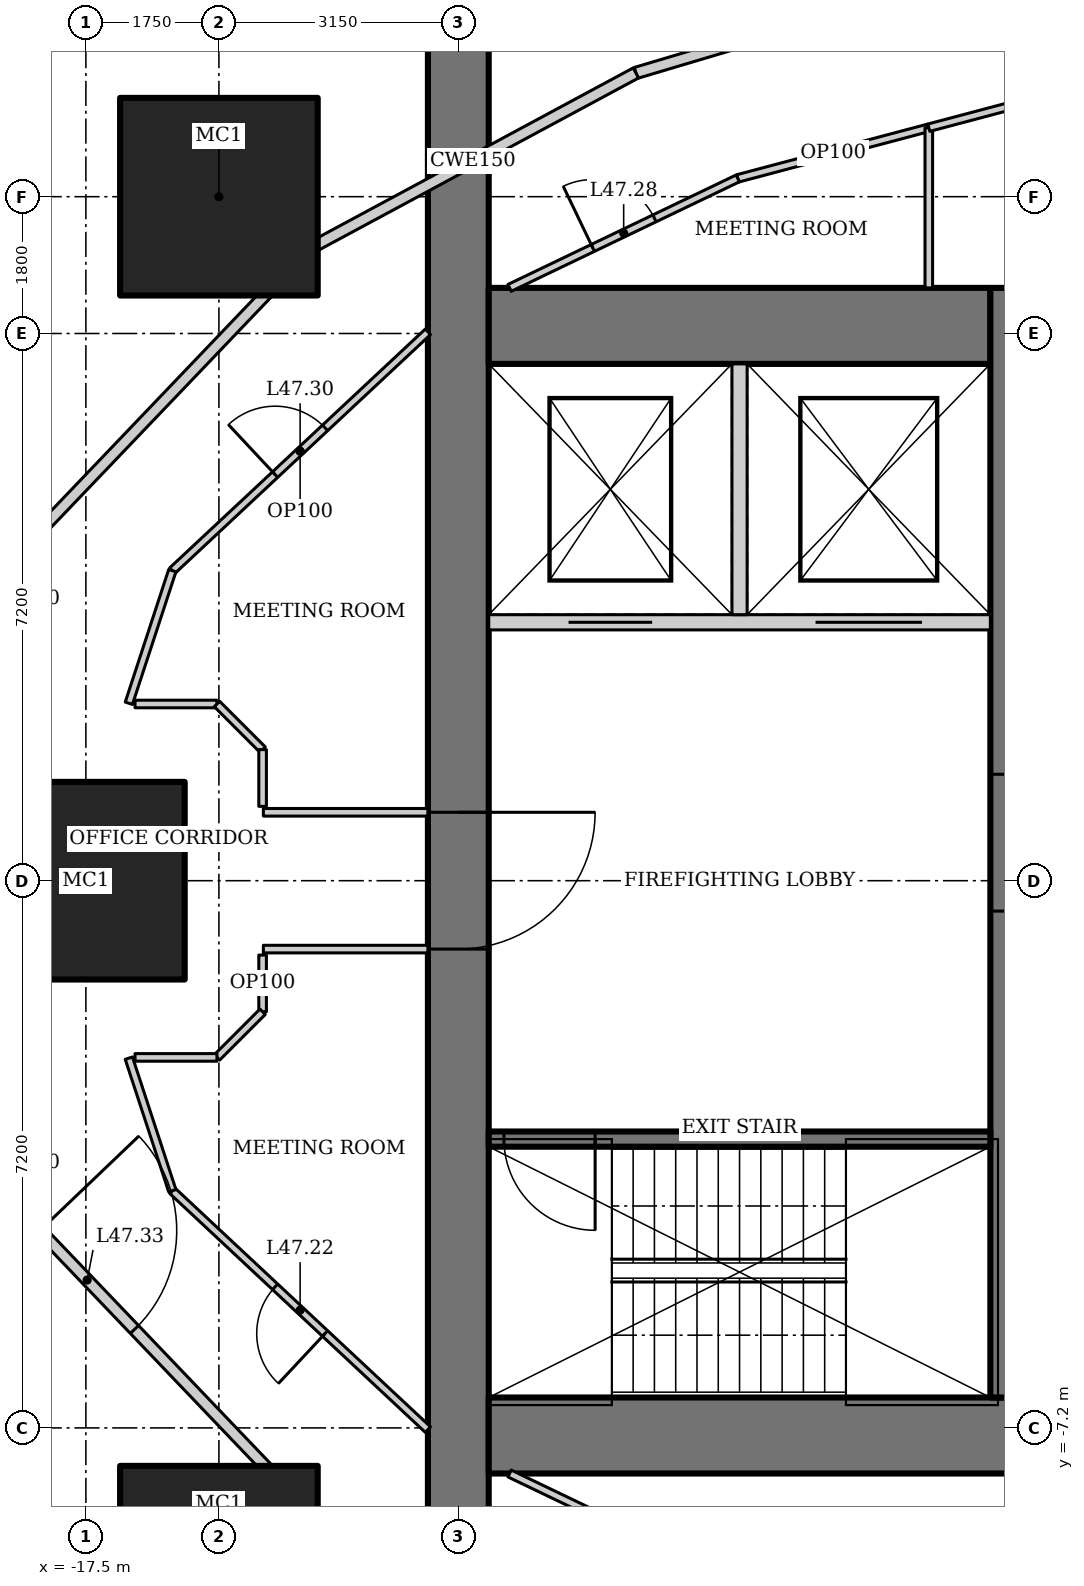
"""IFC4 building model, lengths in metres.
Left out: names, types, materials, properties, quantities, classifications, styles, units other than length and angle.
Written with IfcOpenShell. Run it as: python <this file> out.ifc"""

import sys

from ifc_helpers import new_model, si_unit, direction, frame, frame_2d, origin, origin_2d, place, context, subcontext, project, spatial, rectangle, hollow_rectangle, extrude, element, fill, save


model = new_model("IFC4")
c1 = context("Model", 3, precision=1e-05, world=origin(), true_north=direction((0.0, 1.0)))
c2 = subcontext(c1, "Body", "Model", "MODEL_VIEW")
j1 = project(units=[si_unit("LENGTHUNIT", "METRE"), si_unit("PLANEANGLEUNIT", "RADIAN")], contexts=[c1])
p1 = place(None, origin())
s1 = spatial("IfcSite", under=j1, at=p1, CompositionType="ELEMENT")
p2 = place(p1, origin())
s2 = spatial("IfcBuilding", under=s1, at=p2, CompositionType="ELEMENT")
p3 = place(p2, frame((0.0, 0.0, 203.2)))
s3 = spatial("IfcBuildingStorey", under=s2, at=p3, CompositionType="ELEMENT", Elevation=203.2)
for number, where, z_axis, x_axis in (
    (1, (-15.75, 9.0, 0.0), (0.0, 0.0, 1.0), (1.0, 0.0, 0.0)),
    (2, (-17.5, 0.0, 0.0), (0.0, 0.0, 1.0), (1.0, 0.0, 0.0)),
    (3, (-15.75, -9.0, 0.0), (0.0, 0.0, 1.0), (1.0, 0.0, 0.0)),
):
    element("IfcColumn", number, at=place(p3, frame(where, z_axis=z_axis, x_axis=x_axis)), inside=s3, PredefinedType="COLUMN", context=c2, shape_type="SweptSolid", body=[
        extrude(hollow_rectangle(XDim=2.6, YDim=2.6, WallThickness=0.13, at=origin_2d()), origin(), (0.0, 0.0, 1.0), 4.2),
    ])
p4 = place(p3, frame((-12.6, 13.0, 0.0), z_axis=(0.0, 0.0, 1.0), x_axis=(0.0, -1.0, 0.0)))
e4 = element("IfcWall", 4, at=p4, inside=s3, PredefinedType="SHEAR", context=c2, shape_type="SweptSolid", body=[
    extrude(rectangle(XDim=26.0, YDim=0.8, at=frame_2d((13.0, 0.0))), origin(), (0.0, 0.0, 1.0), 4.2),
])
p5 = place(p4, frame((12.1, 0.0, 0.0)))
e5 = element("IfcOpeningElement", 5, at=p5, cuts=e4, PredefinedType="OPENING", context=c2, shape_type="SweptSolid", body=[
    extrude(rectangle(XDim=1.8, YDim=2.1, at=frame_2d((0.9, 1.05))), frame((0.0, 0.41, 0.0), z_axis=(0.0, -1.0, 0.0), x_axis=(1.0, 0.0, 0.0)), (0.0, 0.0, 1.0), 0.82),
])
p6 = place(p3, frame((-12.2, -7.3, 0.0), z_axis=(0.0, 0.0, 1.0), x_axis=(1.0, 0.0, 0.0)))
e6 = element("IfcWall", 6, at=p6, inside=s3, PredefinedType="SHEAR", context=c2, shape_type="SweptSolid", body=[
    extrude(rectangle(XDim=24.4, YDim=1.0, at=frame_2d((12.2, 0.0))), origin(), (0.0, 0.0, 1.0), 4.2),
])
p7 = place(p3, frame((-5.6, 7.3, 0.0), z_axis=(0.0, 0.0, 1.0), x_axis=(-1.0, 0.0, 0.0)))
e7 = element("IfcWall", 7, at=p7, inside=s3, PredefinedType="SHEAR", context=c2, shape_type="SweptSolid", body=[
    extrude(rectangle(XDim=6.6, YDim=1.0, at=frame_2d((3.3, 0.0))), origin(), (0.0, 0.0, 1.0), 4.2),
])
p8 = place(p3, frame((-5.4, 7.8, 0.0), z_axis=(0.0, 0.0, 1.0), x_axis=(0.0, -1.0, 0.0)))
e8 = element("IfcWall", 8, at=p8, inside=s3, PredefinedType="SHEAR", context=c2, shape_type="SweptSolid", body=[
    extrude(rectangle(XDim=14.6, YDim=0.4, at=frame_2d((7.3, 0.0))), origin(), (0.0, 0.0, 1.0), 4.2),
])
p9 = place(p8, frame((6.4, 0.0, 0.0)))
e9 = element("IfcOpeningElement", 9, at=p9, cuts=e8, PredefinedType="OPENING", context=c2, shape_type="SweptSolid", body=[
    extrude(rectangle(XDim=1.8, YDim=2.1, at=frame_2d((0.9, 1.05))), frame((0.0, 0.21, 0.0), z_axis=(0.0, -1.0, 0.0), x_axis=(1.0, 0.0, 0.0)), (0.0, 0.0, 1.0), 0.42),
])
p10 = place(p3, frame((-5.6, -3.4, 0.0), z_axis=(0.0, 0.0, 1.0), x_axis=(-1.0, 0.0, 0.0)))
e10 = element("IfcWall", 10, at=p10, inside=s3, PredefinedType="SHEAR", context=c2, shape_type="SweptSolid", body=[
    extrude(rectangle(XDim=6.6, YDim=0.2, at=frame_2d((3.3, 0.0))), origin(), (0.0, 0.0, 1.0), 4.2),
])
p11 = place(p10, frame((5.2, 0.0, 0.0)))
e11 = element("IfcOpeningElement", 11, at=p11, cuts=e10, PredefinedType="OPENING", context=c2, shape_type="SweptSolid", body=[
    extrude(rectangle(XDim=1.2, YDim=2.1, at=frame_2d((0.6, 1.05))), frame((0.0, 0.11, 0.0), z_axis=(0.0, -1.0, 0.0), x_axis=(1.0, 0.0, 0.0)), (0.0, 0.0, 1.0), 0.22),
])
p12 = place(p3, frame((-12.2, 3.4, 0.0), z_axis=(0.0, 0.0, 1.0), x_axis=(1.0, 0.0, 0.0)))
e12 = element("IfcWall", 12, at=p12, inside=s3, PredefinedType="SOLIDWALL", context=c2, shape_type="SweptSolid", body=[
    extrude(rectangle(XDim=6.6, YDim=0.2, at=frame_2d((3.3, 0.0))), origin(), (0.0, 0.0, 1.0), 4.2),
])
p13 = place(p12, frame((1.05, 0.0, 0.0)))
e13 = element("IfcOpeningElement", 13, at=p13, cuts=e12, PredefinedType="OPENING", context=c2, shape_type="SweptSolid", body=[
    extrude(rectangle(XDim=1.1, YDim=2.2, at=frame_2d((0.55, 1.1))), frame((0.0, 0.11, 0.0), z_axis=(0.0, -1.0, 0.0), x_axis=(1.0, 0.0, 0.0)), (0.0, 0.0, 1.0), 0.22),
])
p14 = place(p12, frame((4.3, 0.0, 0.0)))
e14 = element("IfcOpeningElement", 14, at=p14, cuts=e12, PredefinedType="OPENING", context=c2, shape_type="SweptSolid", body=[
    extrude(rectangle(XDim=1.4, YDim=2.2, at=frame_2d((0.7, 1.1))), frame((0.0, 0.11, 0.0), z_axis=(0.0, -1.0, 0.0), x_axis=(1.0, 0.0, 0.0)), (0.0, 0.0, 1.0), 0.22),
])
p15 = place(p3, frame((-8.9, 3.5, 0.0), z_axis=(0.0, 0.0, 1.0), x_axis=(0.0, 1.0, 0.0)))
e15 = element("IfcWall", 15, at=p15, inside=s3, PredefinedType="SOLIDWALL", context=c2, shape_type="SweptSolid", body=[
    extrude(rectangle(XDim=3.3, YDim=0.2, at=frame_2d((1.65, 0.0))), origin(), (0.0, 0.0, 1.0), 4.2),
])
p16 = place(p3, frame((-6.054, 11.882, 0.0), z_axis=(0.0, 0.0, 1.0), x_axis=(-0.958384389306, -0.285480931648, 0.0)))
e16 = element("IfcWall", 16, at=p16, inside=s3, PredefinedType="PARTITIONING", context=c2, shape_type="SweptSolid", body=[
    extrude(rectangle(XDim=4.392, YDim=0.15, at=frame_2d((2.196, 0.0))), origin(), (0.0, 0.0, 1.0), 4.05),
])
p17 = place(p3, frame((-10.264, 10.628, 0.0), z_axis=(0.0, 0.0, 1.0), x_axis=(-0.88053863253, -0.47397438393, 0.0)))
e17 = element("IfcWall", 17, at=p17, inside=s3, PredefinedType="PARTITIONING", context=c2, shape_type="SweptSolid", body=[
    extrude(rectangle(XDim=4.875, YDim=0.15, at=frame_2d((2.438, 0.0))), origin(), (0.0, 0.0, 1.0), 4.05),
])
p18 = place(p3, frame((-14.556, 8.318, 0.0), z_axis=(0.0, 0.0, 1.0), x_axis=(-0.690768413292, -0.723076067366, 0.0)))
e18 = element("IfcWall", 18, at=p18, inside=s3, PredefinedType="PARTITIONING", context=c2, shape_type="SweptSolid", body=[
    extrude(rectangle(XDim=5.237, YDim=0.15, at=frame_2d((2.618, 0.0))), origin(), (0.0, 0.0, 1.0), 4.05),
])
p19 = place(p3, frame((-18.174, -4.531, 0.0), z_axis=(0.0, 0.0, 1.0), x_axis=(0.690768413292, -0.723076067366, 0.0)))
e19 = element("IfcWall", 19, at=p19, inside=s3, PredefinedType="PARTITIONING", context=c2, shape_type="SweptSolid", body=[
    extrude(rectangle(XDim=5.237, YDim=0.15, at=frame_2d((2.618, 0.0))), origin(), (0.0, 0.0, 1.0), 4.05),
])
p20 = place(p19, frame((0.1, 0.0, 0.0)))
e20 = element("IfcOpeningElement", 20, at=p20, cuts=e19, PredefinedType="OPENING", context=c2, shape_type="SweptSolid", body=[
    extrude(rectangle(XDim=1.8, YDim=2.1, at=frame_2d((0.9, 1.05))), frame((0.0, 0.085, 0.0), z_axis=(0.0, -1.0, 0.0), x_axis=(1.0, 0.0, 0.0)), (0.0, 0.0, 1.0), 0.17),
])
p21 = place(p3, frame((-13.0, -7.222, 0.0), z_axis=(0.0, 0.0, 1.0), x_axis=(-0.730651186567, 0.682750938167, 0.0)))
e21 = element("IfcWall", 21, at=p21, inside=s3, PredefinedType="PARTITIONING", context=c2, shape_type="SweptSolid", body=[
    extrude(rectangle(XDim=4.603, YDim=0.1, at=frame_2d((2.301, 0.0))), origin(), (0.0, 0.0, 1.0), 4.05),
])
p22 = place(p21, frame((1.851, 0.0, 0.0)))
e22 = element("IfcOpeningElement", 22, at=p22, cuts=e21, PredefinedType="OPENING", context=c2, shape_type="SweptSolid", body=[
    extrude(rectangle(XDim=0.9, YDim=2.1, at=frame_2d((0.45, 1.05))), frame((0.0, 0.06, 0.0), z_axis=(0.0, -1.0, 0.0), x_axis=(1.0, 0.0, 0.0)), (0.0, 0.0, 1.0), 0.12),
])
p23 = place(p3, frame((-8.924, -9.241, 0.0), z_axis=(0.0, 0.0, 1.0), x_axis=(-0.901553947207, 0.432666708073, 0.0)))
e23 = element("IfcWall", 23, at=p23, inside=s3, PredefinedType="PARTITIONING", context=c2, shape_type="SweptSolid", body=[
    extrude(rectangle(XDim=3.33, YDim=0.1, at=frame_2d((1.665, 0.0))), origin(), (0.0, 0.0, 1.0), 4.05),
])
p24 = place(p3, frame((-8.924, 9.241, 0.0), z_axis=(0.0, 0.0, 1.0), x_axis=(0.966575327783, 0.256382791392, 0.0)))
e24 = element("IfcWall", 24, at=p24, inside=s3, PredefinedType="PARTITIONING", context=c2, shape_type="SweptSolid", body=[
    extrude(rectangle(XDim=2.601, YDim=0.1, at=frame_2d((1.3, 0.0))), origin(), (0.0, 0.0, 1.0), 4.05),
])
p25 = place(p3, frame((-6.41, 9.907, 0.0), z_axis=(0.0, 0.0, 1.0), x_axis=(0.0, -1.0, 0.0)))
e25 = element("IfcWall", 25, at=p25, inside=s3, PredefinedType="PARTITIONING", context=c2, shape_type="SweptSolid", body=[
    extrude(rectangle(XDim=2.107, YDim=0.1, at=frame_2d((1.054, 0.0))), origin(), (0.0, 0.0, 1.0), 4.05),
])
p26 = place(p3, frame((-11.926, 7.8, 0.0), z_axis=(0.0, 0.0, 1.0), x_axis=(0.901553947207, 0.432666708073, 0.0)))
e26 = element("IfcWall", 26, at=p26, inside=s3, PredefinedType="PARTITIONING", context=c2, shape_type="SweptSolid", body=[
    extrude(rectangle(XDim=3.33, YDim=0.1, at=frame_2d((1.665, 0.0))), origin(), (0.0, 0.0, 1.0), 4.05),
])
p27 = place(p26, frame((1.215, 0.0, 0.0)))
e27 = element("IfcOpeningElement", 27, at=p27, cuts=e26, PredefinedType="OPENING", context=c2, shape_type="SweptSolid", body=[
    extrude(rectangle(XDim=0.9, YDim=2.1, at=frame_2d((0.45, 1.05))), frame((0.0, 0.06, 0.0), z_axis=(0.0, -1.0, 0.0), x_axis=(1.0, 0.0, 0.0)), (0.0, 0.0, 1.0), 0.12),
])
p28 = place(p3, frame((-6.41, 9.907, 0.0), z_axis=(0.0, 0.0, 1.0), x_axis=(0.966534683979, 0.256535971486, 0.0)))
e28 = element("IfcWall", 28, at=p28, inside=s3, PredefinedType="PARTITIONING", context=c2, shape_type="SweptSolid", body=[
    extrude(rectangle(XDim=1.241, YDim=0.1, at=frame_2d((0.621, 0.0))), origin(), (0.0, 0.0, 1.0), 4.05),
])
p29 = place(p3, frame((-16.363, 4.08, 0.0), z_axis=(0.0, 0.0, 1.0), x_axis=(0.730651186567, 0.682750938167, 0.0)))
e29 = element("IfcWall", 29, at=p29, inside=s3, PredefinedType="PARTITIONING", context=c2, shape_type="SweptSolid", body=[
    extrude(rectangle(XDim=4.603, YDim=0.1, at=frame_2d((2.301, 0.0))), origin(), (0.0, 0.0, 1.0), 4.05),
])
p30 = place(p29, frame((1.851, 0.0, 0.0)))
e30 = element("IfcOpeningElement", 30, at=p30, cuts=e29, PredefinedType="OPENING", context=c2, shape_type="SweptSolid", body=[
    extrude(rectangle(XDim=0.9, YDim=2.1, at=frame_2d((0.45, 1.05))), frame((0.0, 0.06, 0.0), z_axis=(0.0, -1.0, 0.0), x_axis=(1.0, 0.0, 0.0)), (0.0, 0.0, 1.0), 0.12),
])
p31 = place(p3, frame((-16.363, -4.08, 0.0), z_axis=(0.0, 0.0, 1.0), x_axis=(-0.311517212063, 0.950240509865, 0.0)))
e31 = element("IfcWall", 31, at=p31, inside=s3, PredefinedType="PARTITIONING", context=c2, shape_type="SweptSolid", body=[
    extrude(rectangle(XDim=1.836, YDim=0.1, at=frame_2d((0.918, 0.0))), origin(), (0.0, 0.0, 1.0), 4.05),
])
for number, where, z_axis, x_axis in (
    (32, (-15.165, -0.9, 0.0), (0.0, 0.0, 1.0), (1.0, 0.0, 0.0)),
    (33, (-13.0, 0.9, 0.0), (0.0, 0.0, 1.0), (-1.0, 0.0, 0.0)),
):
    element("IfcWall", number, at=place(p3, frame(where, z_axis=z_axis, x_axis=x_axis)), inside=s3, PredefinedType="PARTITIONING", context=c2, shape_type="SweptSolid", body=[
        extrude(rectangle(XDim=2.165, YDim=0.1, at=frame_2d((1.083, 0.0))), origin(), (0.0, 0.0, 1.0), 4.05),
    ])
p32 = place(p3, frame((-16.935, 2.335, 0.0), z_axis=(0.0, 0.0, 1.0), x_axis=(0.311517212063, 0.950240509865, 0.0)))
e34 = element("IfcWall", 34, at=p32, inside=s3, PredefinedType="PARTITIONING", context=c2, shape_type="SweptSolid", body=[
    extrude(rectangle(XDim=1.836, YDim=0.1, at=frame_2d((0.918, 0.0))), origin(), (0.0, 0.0, 1.0), 4.05),
])
p33 = place(p3, frame((-15.175, -0.978, 0.0), z_axis=(0.0, 0.0, 1.0), x_axis=(0.0, -1.0, 0.0)))
e35 = element("IfcWall", 35, at=p33, inside=s3, PredefinedType="PARTITIONING", context=c2, shape_type="SweptSolid", body=[
    extrude(rectangle(XDim=0.746, YDim=0.1, at=frame_2d((0.373, 0.0))), origin(), (0.0, 0.0, 1.0), 4.05),
])
p34 = place(p3, frame((-15.175, -1.725, 0.0), z_axis=(0.0, 0.0, 1.0), x_axis=(-0.707106781187, -0.707106781187, 0.0)))
e36 = element("IfcWall", 36, at=p34, inside=s3, PredefinedType="PARTITIONING", context=c2, shape_type="SweptSolid", body=[
    extrude(rectangle(XDim=0.849, YDim=0.1, at=frame_2d((0.425, 0.0))), origin(), (0.0, 0.0, 1.0), 4.05),
])
for number, where, z_axis, x_axis in (
    (37, (-15.775, -2.325, 0.0), (0.0, 0.0, 1.0), (-1.0, 0.0, 0.0)),
    (38, (-16.854, 2.325, 0.0), (0.0, 0.0, 1.0), (1.0, 0.0, 0.0)),
):
    element("IfcWall", number, at=place(p3, frame(where, z_axis=z_axis, x_axis=x_axis)), inside=s3, PredefinedType="PARTITIONING", context=c2, shape_type="SweptSolid", body=[
        extrude(rectangle(XDim=1.078, YDim=0.1, at=frame_2d((0.539, 0.0))), origin(), (0.0, 0.0, 1.0), 4.05),
    ])
p35 = place(p3, frame((-15.775, 2.325, 0.0), z_axis=(0.0, 0.0, 1.0), x_axis=(0.707106781187, -0.707106781187, 0.0)))
e39 = element("IfcWall", 39, at=p35, inside=s3, PredefinedType="PARTITIONING", context=c2, shape_type="SweptSolid", body=[
    extrude(rectangle(XDim=0.849, YDim=0.1, at=frame_2d((0.425, 0.0))), origin(), (0.0, 0.0, 1.0), 4.05),
])
p36 = place(p3, frame((-15.175, 1.725, 0.0), z_axis=(0.0, 0.0, 1.0), x_axis=(0.0, -1.0, 0.0)))
e40 = element("IfcWall", 40, at=p36, inside=s3, PredefinedType="PARTITIONING", context=c2, shape_type="SweptSolid", body=[
    extrude(rectangle(XDim=0.746, YDim=0.1, at=frame_2d((0.373, 0.0))), origin(), (0.0, 0.0, 1.0), 4.05),
])
p37 = place(p9, origin())
e41 = element("IfcDoor", 41, at=p37, inside=s3, OperationType="DOUBLE_DOOR_DOUBLE_SWING", PredefinedType="DOOR", context=c2, shape_type="SweptSolid", body=[
    extrude(rectangle(XDim=1.8, YDim=2.1, at=frame_2d((0.9, 1.05))), frame((0.0, 0.025, 0.0), z_axis=(0.0, -1.0, 0.0), x_axis=(1.0, 0.0, 0.0)), (0.0, 0.0, 1.0), 0.05),
])
fill(e9, e41)
p38 = place(p11, origin())
e42 = element("IfcDoor", 42, at=p38, inside=s3, OperationType="SINGLE_SWING_RIGHT", PredefinedType="DOOR", context=c2, shape_type="SweptSolid", body=[
    extrude(rectangle(XDim=1.2, YDim=2.1, at=frame_2d((0.6, 1.05))), frame((0.0, 0.025, 0.0), z_axis=(0.0, -1.0, 0.0), x_axis=(1.0, 0.0, 0.0)), (0.0, 0.0, 1.0), 0.05),
])
fill(e11, e42)
p39 = place(p5, origin())
e43 = element("IfcDoor", 43, at=p39, inside=s3, OperationType="DOUBLE_DOOR_DOUBLE_SWING", PredefinedType="DOOR", context=c2, shape_type="SweptSolid", body=[
    extrude(rectangle(XDim=1.8, YDim=2.1, at=frame_2d((0.9, 1.05))), frame((0.0, 0.025, 0.0), z_axis=(0.0, -1.0, 0.0), x_axis=(1.0, 0.0, 0.0)), (0.0, 0.0, 1.0), 0.05),
])
fill(e5, e43)
p40 = place(p13, origin())
e44 = element("IfcDoor", 44, at=p40, inside=s3, OperationType="DOUBLE_DOOR_SLIDING", PredefinedType="DOOR", context=c2, shape_type="SweptSolid", body=[
    extrude(rectangle(XDim=1.1, YDim=2.2, at=frame_2d((0.55, 1.1))), frame((0.0, 0.025, 0.0), z_axis=(0.0, -1.0, 0.0), x_axis=(1.0, 0.0, 0.0)), (0.0, 0.0, 1.0), 0.05),
])
fill(e13, e44)
p41 = place(p14, origin())
e45 = element("IfcDoor", 45, at=p41, inside=s3, OperationType="DOUBLE_DOOR_SLIDING", PredefinedType="DOOR", context=c2, shape_type="SweptSolid", body=[
    extrude(rectangle(XDim=1.4, YDim=2.2, at=frame_2d((0.7, 1.1))), frame((0.0, 0.025, 0.0), z_axis=(0.0, -1.0, 0.0), x_axis=(1.0, 0.0, 0.0)), (0.0, 0.0, 1.0), 0.05),
])
fill(e14, e45)
p42 = place(p22, origin())
e46 = element("IfcDoor", 46, at=p42, inside=s3, OperationType="SINGLE_SWING_LEFT", PredefinedType="DOOR", context=c2, shape_type="SweptSolid", body=[
    extrude(rectangle(XDim=0.9, YDim=2.1, at=frame_2d((0.45, 1.05))), frame((0.0, 0.025, 0.0), z_axis=(0.0, -1.0, 0.0), x_axis=(1.0, 0.0, 0.0)), (0.0, 0.0, 1.0), 0.05),
])
fill(e22, e46)
p43 = place(p27, origin())
e47 = element("IfcDoor", 47, at=p43, inside=s3, OperationType="SINGLE_SWING_LEFT", PredefinedType="DOOR", context=c2, shape_type="SweptSolid", body=[
    extrude(rectangle(XDim=0.9, YDim=2.1, at=frame_2d((0.45, 1.05))), frame((0.0, 0.025, 0.0), z_axis=(0.0, -1.0, 0.0), x_axis=(1.0, 0.0, 0.0)), (0.0, 0.0, 1.0), 0.05),
])
fill(e27, e47)
p44 = place(p30, origin())
e48 = element("IfcDoor", 48, at=p44, inside=s3, OperationType="SINGLE_SWING_LEFT", PredefinedType="DOOR", context=c2, shape_type="SweptSolid", body=[
    extrude(rectangle(XDim=0.9, YDim=2.1, at=frame_2d((0.45, 1.05))), frame((0.0, 0.025, 0.0), z_axis=(0.0, -1.0, 0.0), x_axis=(1.0, 0.0, 0.0)), (0.0, 0.0, 1.0), 0.05),
])
fill(e30, e48)
p45 = place(p20, origin())
e49 = element("IfcDoor", 49, at=p45, inside=s3, OperationType="DOUBLE_DOOR_DOUBLE_SWING", PredefinedType="DOOR", context=c2, shape_type="SweptSolid", body=[
    extrude(rectangle(XDim=1.8, YDim=2.1, at=frame_2d((0.9, 1.05))), frame((0.0, 0.025, 0.0), z_axis=(0.0, -1.0, 0.0), x_axis=(1.0, 0.0, 0.0)), (0.0, 0.0, 1.0), 0.05),
])
fill(e20, e49)
save(model, sys.argv[1])
